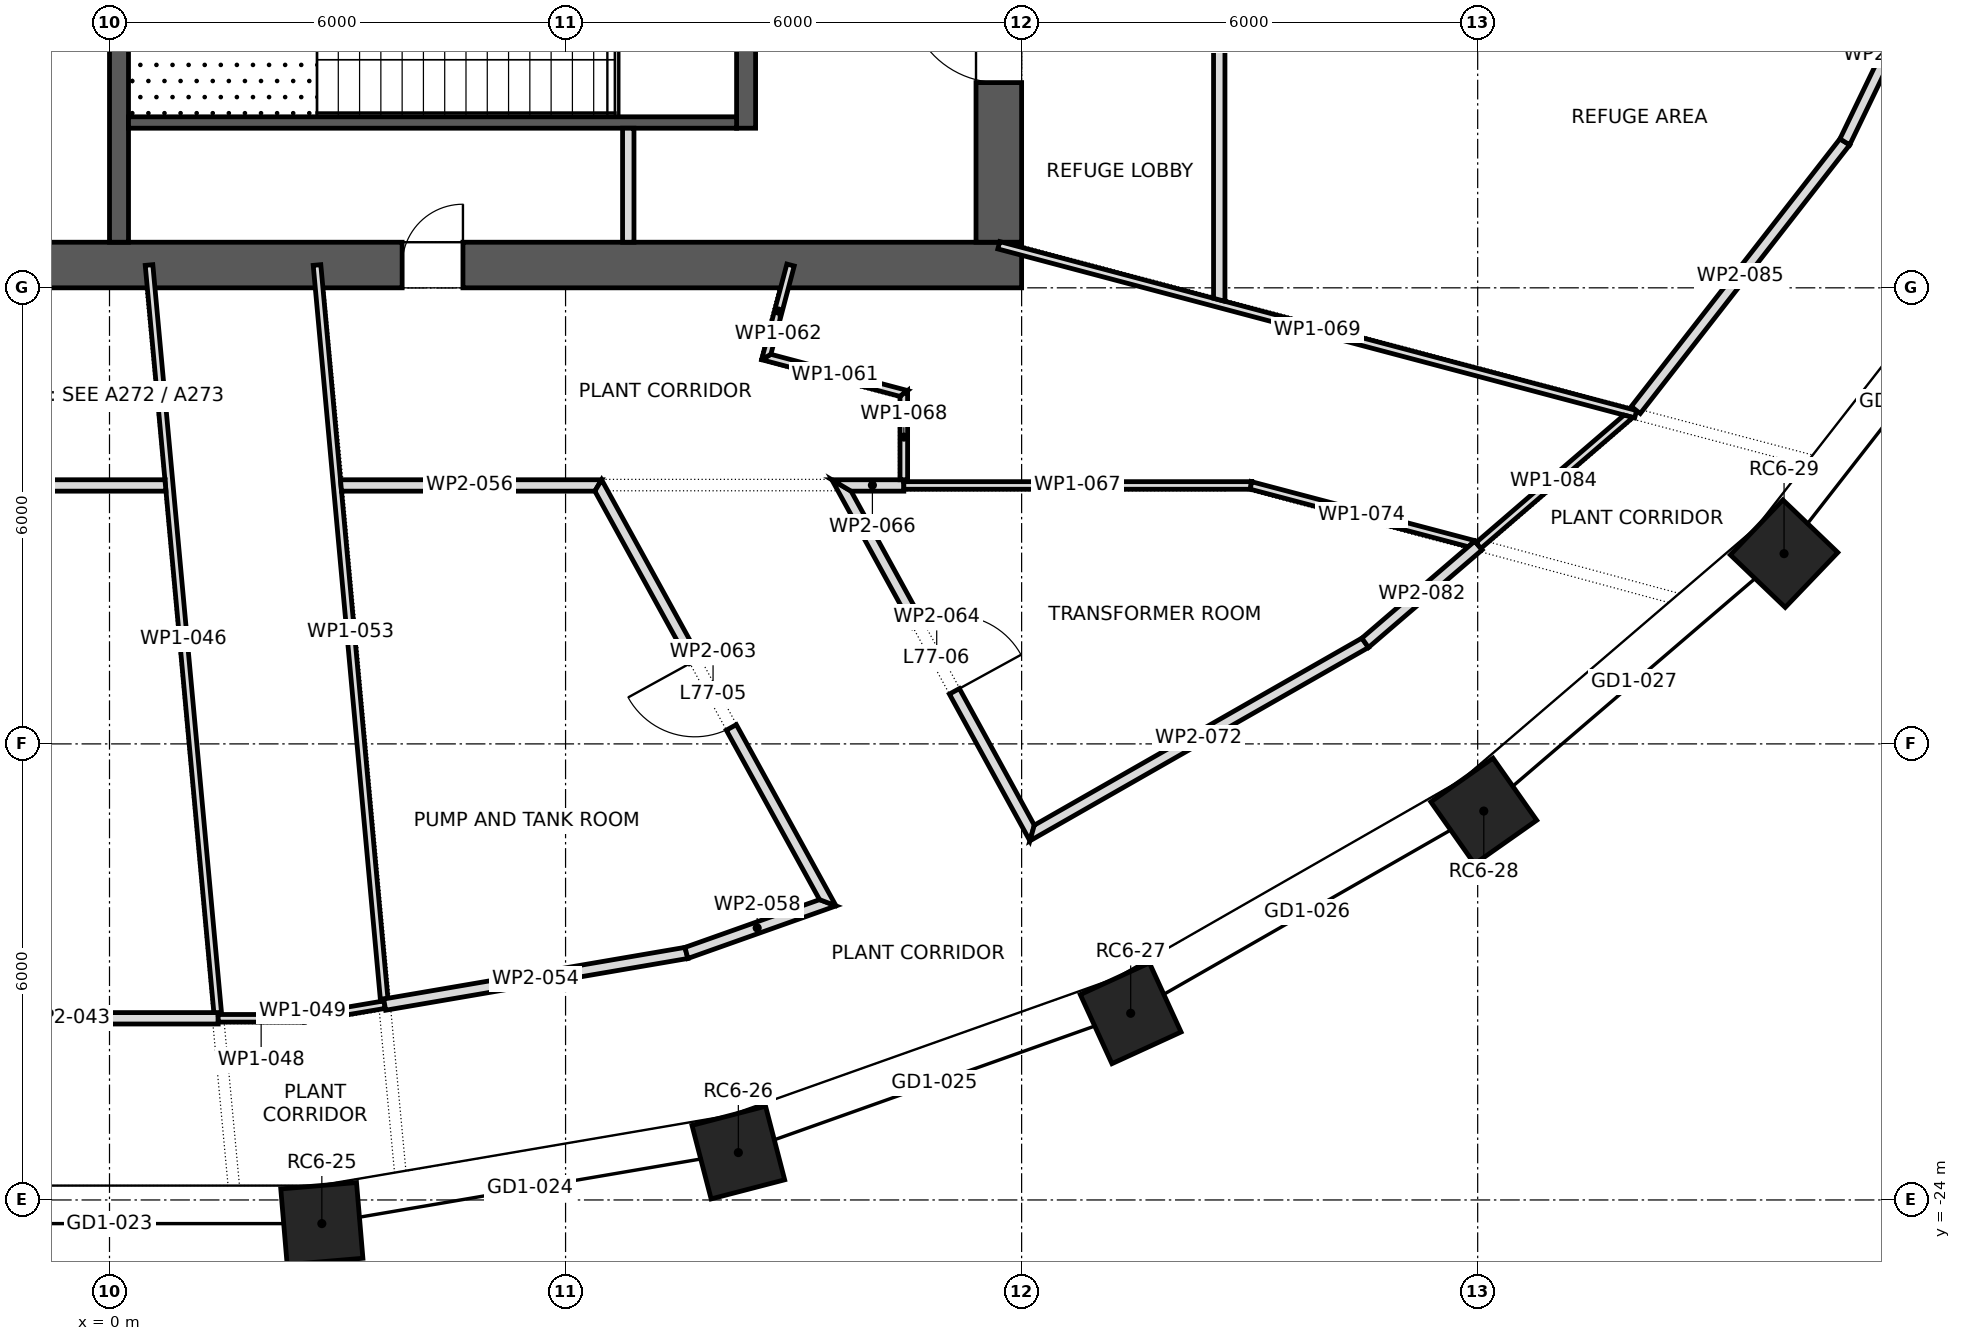
"""IFC4 building model, lengths in metres.
Left out: names, types, materials, properties, quantities, classifications, styles, units other than length and angle.
Written with IfcOpenShell. Run it as: python <this file> out.ifc"""

import sys

from ifc_helpers import new_model, si_unit, direction, frame, frame_2d, origin, origin_2d, place, context, subcontext, project, spatial, polyline, rectangle, outline, extrude, element, fill, save


model = new_model("IFC4")
c1 = context("Model", 3, precision=1e-05, world=origin(), true_north=direction((0.0, 1.0)))
c2 = subcontext(c1, "Body", "Model", "MODEL_VIEW")
j1 = project(units=[si_unit("LENGTHUNIT", "METRE"), si_unit("PLANEANGLEUNIT", "RADIAN")], contexts=[c1])
p1 = place(None, origin())
s1 = spatial("IfcSite", under=j1, at=p1, CompositionType="ELEMENT")
p2 = place(p1, origin())
s2 = spatial("IfcBuilding", under=s1, at=p2, CompositionType="ELEMENT")
p3 = place(p2, frame((0.0, 0.0, 328.3)))
s3 = spatial("IfcBuildingStorey", under=s2, at=p3, CompositionType="ELEMENT", Elevation=328.3)
for number, where, z_axis, x_axis in (
    (1, (2.793, -24.311, 0.0), (0.0, 0.0, 1.0), (0.996, 0.084, 0.0)),
    (2, (8.273, -23.377, 0.0), (0.0, 0.0, 1.0), (0.968, 0.252, 0.0)),
    (3, (13.435, -21.544, 0.0), (0.0, 0.0, 1.0), (0.909, 0.417, 0.0)),
    (4, (18.08, -18.884, 0.0), (0.0, 0.0, 1.0), (0.818, 0.575, 0.0)),
    (5, (22.031, -15.497, 0.0), (0.0, 0.0, 1.0), (0.692, 0.722, 0.0)),
):
    element("IfcColumn", number, at=place(p3, frame(where, z_axis=z_axis, x_axis=x_axis)), inside=s3, PredefinedType="COLUMN", context=c2, shape_type="SweptSolid", body=[
        extrude(rectangle(XDim=1.0, YDim=1.0, at=origin_2d()), origin(), (0.0, 0.0, 1.0), 5.0),
    ])
p4 = place(p3, frame((-12.0, -11.7, 0.0), z_axis=(0.0, 0.0, 1.0), x_axis=(1.0, 0.0, 0.0)))
e6 = element("IfcWall", 6, at=p4, inside=s3, PredefinedType="SHEAR", context=c2, shape_type="SweptSolid", body=[
    extrude(rectangle(XDim=24.0, YDim=0.6, at=frame_2d((12.0, 0.0))), origin(), (0.0, 0.0, 1.0), 5.0),
])
p5 = place(p4, frame((10.025, 0.0, 0.0)))
e7 = element("IfcOpeningElement", 7, at=p5, cuts=e6, PredefinedType="OPENING", context=c2, shape_type="SweptSolid", body=[
    extrude(rectangle(XDim=0.8, YDim=2.1, at=frame_2d((0.4, 1.05))), frame((0.0, 0.312, 0.0), z_axis=(0.0, -1.0, 0.0), x_axis=(1.0, 0.0, 0.0)), (0.0, 0.0, 1.0), 0.624),
])
p6 = place(p4, frame((4.2, 0.0, 0.0)))
e8 = element("IfcOpeningElement", 8, at=p6, cuts=e6, PredefinedType="OPENING", context=c2, shape_type="SweptSolid", body=[
    extrude(rectangle(XDim=0.8, YDim=2.1, at=frame_2d((0.4, 1.05))), frame((0.0, 0.312, 0.0), z_axis=(0.0, -1.0, 0.0), x_axis=(1.0, 0.0, 0.0)), (0.0, 0.0, 1.0), 0.624),
])
p7 = place(p4, frame((15.85, 0.0, 0.0)))
e9 = element("IfcOpeningElement", 9, at=p7, cuts=e6, PredefinedType="OPENING", context=c2, shape_type="SweptSolid", body=[
    extrude(rectangle(XDim=0.8, YDim=2.1, at=frame_2d((0.4, 1.05))), frame((0.0, 0.312, 0.0), z_axis=(0.0, -1.0, 0.0), x_axis=(1.0, 0.0, 0.0)), (0.0, 0.0, 1.0), 0.624),
])
p8 = place(p3, frame((11.7, -11.4, 0.0), z_axis=(0.0, 0.0, 1.0), x_axis=(0.0, 1.0, 0.0)))
e10 = element("IfcWall", 10, at=p8, inside=s3, PredefinedType="SHEAR", context=c2, shape_type="SweptSolid", body=[
    extrude(rectangle(XDim=22.8, YDim=0.6, at=frame_2d((11.4, 0.0))), origin(), (0.0, 0.0, 1.0), 5.0),
])
p9 = place(p8, frame((10.2, 0.0, 0.0)))
e11 = element("IfcOpeningElement", 11, at=p9, cuts=e10, PredefinedType="OPENING", context=c2, shape_type="SweptSolid", body=[
    extrude(rectangle(XDim=2.4, YDim=2.1, at=frame_2d((1.2, 1.05))), frame((0.0, 0.312, 0.0), z_axis=(0.0, -1.0, 0.0), x_axis=(1.0, 0.0, 0.0)), (0.0, 0.0, 1.0), 0.624),
])
p10 = place(p8, frame((19.5, 0.0, 0.0)))
e12 = element("IfcOpeningElement", 12, at=p10, cuts=e10, PredefinedType="OPENING", context=c2, shape_type="SweptSolid", body=[
    extrude(rectangle(XDim=1.2, YDim=2.1, at=frame_2d((0.6, 1.05))), frame((0.0, 0.312, 0.0), z_axis=(0.0, -1.0, 0.0), x_axis=(1.0, 0.0, 0.0)), (0.0, 0.0, 1.0), 0.624),
])
p11 = place(p8, frame((2.1, 0.0, 0.0)))
e13 = element("IfcOpeningElement", 13, at=p11, cuts=e10, PredefinedType="OPENING", context=c2, shape_type="SweptSolid", body=[
    extrude(rectangle(XDim=1.2, YDim=2.1, at=frame_2d((0.6, 1.05))), frame((0.0, 0.312, 0.0), z_axis=(0.0, -1.0, 0.0), x_axis=(1.0, 0.0, 0.0)), (0.0, 0.0, 1.0), 0.624),
])
p12 = place(p3, frame((0.125, -11.4, 0.0), z_axis=(0.0, 0.0, 1.0), x_axis=(0.0, 1.0, 0.0)))
e14 = element("IfcWall", 14, at=p12, inside=s3, PredefinedType="SHEAR", context=c2, shape_type="SweptSolid", body=[
    extrude(rectangle(XDim=4.9, YDim=0.25, at=frame_2d((2.45, 0.0))), origin(), (0.0, 0.0, 1.0), 4.65),
])
p13 = place(p3, frame((8.375, -9.9, 0.0), z_axis=(0.0, 0.0, 1.0), x_axis=(0.0, 1.0, 0.0)))
e15 = element("IfcWall", 15, at=p13, inside=s3, PredefinedType="SHEAR", context=c2, shape_type="SweptSolid", body=[
    extrude(rectangle(XDim=3.4, YDim=0.25, at=frame_2d((1.7, 0.0))), origin(), (0.0, 0.0, 1.0), 4.65),
])
p14 = place(p13, frame((1.175, 0.0, 0.0)))
e16 = element("IfcOpeningElement", 16, at=p14, cuts=e15, PredefinedType="OPENING", context=c2, shape_type="SweptSolid", body=[
    extrude(rectangle(XDim=1.2, YDim=2.1, at=frame_2d((0.6, 1.05))), frame((0.0, 0.137, 0.0), z_axis=(0.0, -1.0, 0.0), x_axis=(1.0, 0.0, 0.0)), (0.0, 0.0, 1.0), 0.274),
])
p15 = place(p3, frame((0.25, -9.825, 0.0), z_axis=(0.0, 0.0, 1.0), x_axis=(1.0, 0.0, 0.0)))
e17 = element("IfcWall", 17, at=p15, inside=s3, PredefinedType="SHEAR", context=c2, shape_type="SweptSolid", body=[
    extrude(rectangle(XDim=8.0, YDim=0.15, at=frame_2d((4.0, 0.0))), origin(), (0.0, 0.0, 1.0), 4.65),
])
p16 = place(p3, frame((6.825, -11.4, 0.0), z_axis=(0.0, 0.0, 1.0), x_axis=(0.0, 1.0, 0.0)))
e18 = element("IfcWall", 18, at=p16, inside=s3, PredefinedType="PARTITIONING", context=c2, shape_type="SweptSolid", body=[
    extrude(rectangle(XDim=1.5, YDim=0.15, at=frame_2d((0.75, 0.0))), origin(), (0.0, 0.0, 1.0), 4.65),
])
p17 = place(p3, frame((-2.566, -21.61, 0.0), z_axis=(0.0, 0.0, 1.0), x_axis=(1.0, 0.0, 0.0)))
e19 = element("IfcWall", 19, at=p17, inside=s3, PredefinedType="PARTITIONING", context=c2, shape_type="SweptSolid", body=[
    extrude(outline(polyline([(3.996, 0.075), (2.005, 0.075), (0.013, 0.075), (0.0, -0.075), (1.998, -0.075), (3.996, -0.075), (3.996, 0.075)])), origin(), (0.0, 0.0, 1.0), 4.65),
])
p18 = place(p3, frame((0.52, -11.7, 0.0), z_axis=(0.0, 0.0, 1.0), x_axis=(0.091437926601, -0.995810777999, 0.0)))
e20 = element("IfcWall", 20, at=p18, inside=s3, PredefinedType="PARTITIONING", context=c2, shape_type="SweptSolid", body=[
    extrude(outline(polyline([(0.0, -0.05), (1.416, -0.05), (2.832, -0.05), (2.833, -0.049), (2.842, -0.05), (4.599, -0.05), (6.357, -0.05), (8.114, -0.05), (9.872, -0.05), (9.877, 0.007), (9.902, 0.005), (9.906, 0.046), (9.906, 0.05), (7.925, 0.05), (5.943, 0.05), (3.962, 0.05), (1.981, 0.05), (0.0, 0.05), (0.0, -0.05)])), origin(), (0.0, 0.0, 1.0), 4.65),
])
p19 = place(p3, frame((0.742, -14.6, 0.0), z_axis=(0.0, 0.0, 1.0), x_axis=(-1.0, 0.0, 0.0)))
e21 = element("IfcWall", 21, at=p19, inside=s3, PredefinedType="PARTITIONING", context=c2, shape_type="SweptSolid", body=[
    extrude(outline(polyline([(0.013, -0.075), (1.408, -0.075), (2.802, -0.075), (4.196, -0.075), (4.142, 0.0), (4.088, 0.075), (2.726, 0.075), (1.363, 0.075), (0.0, 0.075), (0.0, 0.069), (0.013, -0.075)])), origin(), (0.0, 0.0, 1.0), 4.65),
])
p20 = place(p3, frame((1.43, -21.61, 0.0), z_axis=(0.0, 0.0, 1.0), x_axis=(1.0, 0.0, 0.0)))
e22 = element("IfcWall", 22, at=p20, inside=s3, PredefinedType="PARTITIONING", context=c2, shape_type="SweptSolid", body=[
    extrude(outline(polyline([(1.134, -0.05), (1.134, -0.05), (1.126, 0.05), (0.0, 0.05), (0.0, -0.05), (1.134, -0.05)])), origin(), (0.0, 0.0, 1.0), 4.65),
])
p21 = place(p3, frame((2.556, -21.611, 0.0), z_axis=(0.0, 0.0, 1.0), x_axis=(0.985894311429, 0.167369073287, 0.0)))
e23 = element("IfcWall", 23, at=p21, inside=s3, PredefinedType="PARTITIONING", context=c2, shape_type="SweptSolid", body=[
    extrude(outline(polyline([(1.079, 0.05), (0.008, 0.05), (0.0, -0.049), (0.0, -0.05), (1.079, -0.05), (1.079, 0.05)])), origin(), (0.0, 0.0, 1.0), 4.65),
])
p22 = place(p3, frame((2.73, -11.7, 0.0), z_axis=(0.0, 0.0, 1.0), x_axis=(0.091085808065, -0.995843047658, 0.0)))
e24 = element("IfcWall", 24, at=p22, inside=s3, PredefinedType="PARTITIONING", context=c2, shape_type="SweptSolid", body=[
    extrude(outline(polyline([(9.724, -0.05), (9.724, -0.05), (9.721, -0.004), (9.696, -0.006), (9.691, 0.05), (7.753, 0.05), (5.815, 0.05), (3.877, 0.05), (1.938, 0.05), (0.0, 0.05), (0.0, -0.05), (1.945, -0.05), (3.89, -0.05), (5.835, -0.05), (7.78, -0.05), (9.724, -0.05)])), origin(), (0.0, 0.0, 1.0), 4.65),
])
p23 = place(p3, frame((3.62, -21.43, 0.0), z_axis=(0.0, 0.0, 1.0), x_axis=(0.985641254307, 0.168852947287, 0.0)))
e25 = element("IfcWall", 25, at=p23, inside=s3, PredefinedType="PARTITIONING", context=c2, shape_type="SweptSolid", body=[
    extrude(outline(polyline([(4.034, -0.075), (4.034, -0.073), (4.021, 0.075), (2.681, 0.075), (1.34, 0.075), (0.0, 0.075), (0.0, -0.075), (1.345, -0.075), (2.689, -0.075), (4.034, -0.075)])), origin(), (0.0, 0.0, 1.0), 4.65),
])
p24 = place(p3, frame((6.474, -14.6, 0.0), z_axis=(0.0, 0.0, 1.0), x_axis=(-1.0, 0.0, 0.0)))
e26 = element("IfcWall", 26, at=p24, inside=s3, PredefinedType="PARTITIONING", context=c2, shape_type="SweptSolid", body=[
    extrude(outline(polyline([(3.435, -0.075), (3.435, -0.071), (3.422, 0.075), (1.755, 0.075), (0.089, 0.075), (0.044, 0.0), (0.0, -0.075), (1.718, -0.075), (3.435, -0.075)])), origin(), (0.0, 0.0, 1.0), 4.65),
])
p25 = place(p3, frame((7.584, -20.752, 0.0), z_axis=(0.0, 0.0, 1.0), x_axis=(0.942428945509, 0.334406463255, 0.0)))
e27 = element("IfcWall", 27, at=p25, inside=s3, PredefinedType="PARTITIONING", context=c2, shape_type="SweptSolid", body=[
    extrude(outline(polyline([(0.0, -0.075), (2.068, -0.075), (1.892, 0.075), (0.013, 0.075), (0.0, -0.074), (0.0, -0.075)])), origin(), (0.0, 0.0, 1.0), 4.65),
])
p26 = place(p3, frame((8.592, -12.897, 0.0), z_axis=(0.0, 0.0, 1.0), x_axis=(0.966587372572, -0.256337377657, 0.0)))
e28 = element("IfcWall", 28, at=p26, inside=s3, PredefinedType="PARTITIONING", context=c2, shape_type="SweptSolid", body=[
    extrude(outline(polyline([(0.0, -0.05), (1.884, -0.05), (1.961, 0.05), (0.1, 0.05), (0.0, -0.05), (0.0, -0.05)])), origin(), (0.0, 0.0, 1.0), 4.65),
])
p27 = place(p3, frame((8.96, -11.7, 0.0), z_axis=(0.0, 0.0, 1.0), x_axis=(-0.255665703413, -0.966765249737, 0.0)))
e29 = element("IfcWall", 29, at=p27, inside=s3, PredefinedType="PARTITIONING", context=c2, shape_type="SweptSolid", body=[
    extrude(outline(polyline([(1.302, -0.05), (1.302, -0.05), (1.202, 0.05), (0.0, 0.05), (0.0, -0.05), (1.302, -0.05)])), origin(), (0.0, 0.0, 1.0), 4.65),
])
p28 = place(p3, frame((9.492, -20.167, 0.0), z_axis=(0.0, 0.0, 1.0), x_axis=(-0.481958297576, 0.876194156222, 0.0)))
e30 = element("IfcWall", 30, at=p28, inside=s3, PredefinedType="PARTITIONING", context=c2, shape_type="SweptSolid", body=[
    extrude(outline(polyline([(0.0, -0.075), (1.6, -0.075), (3.199, -0.075), (4.799, -0.075), (6.398, -0.075), (6.31, 0.075), (4.776, 0.075), (3.243, 0.075), (1.71, 0.075), (0.176, 0.075), (0.0, -0.075), (0.0, -0.075)])), origin(), (0.0, 0.0, 1.0), 4.65),
])
p29 = place(p28, frame((2.721, 0.0, 0.0)))
e31 = element("IfcOpeningElement", 31, at=p29, cuts=e30, PredefinedType="OPENING", context=c2, shape_type="SweptSolid", body=[
    extrude(rectangle(XDim=1.0, YDim=2.1, at=frame_2d((0.5, 1.05))), frame((0.0, 0.087, 0.0), z_axis=(0.0, -1.0, 0.0), x_axis=(1.0, 0.0, 0.0)), (0.0, 0.0, 1.0), 0.174),
])
p30 = place(p3, frame((9.569, -14.489, 0.0), z_axis=(0.0, 0.0, 1.0), x_axis=(0.480884015224, -0.876784217412, 0.0)))
e32 = element("IfcWall", 32, at=p30, inside=s3, PredefinedType="PARTITIONING", context=c2, shape_type="SweptSolid", body=[
    extrude(outline(polyline([(5.418, -0.075), (5.418, -0.075), (5.266, 0.075), (3.595, 0.075), (1.924, 0.075), (0.253, 0.075), (0.0, -0.075), (0.0, -0.075), (1.806, -0.075), (3.612, -0.075), (5.418, -0.075)])), origin(), (0.0, 0.0, 1.0), 4.65),
])
p31 = place(p30, frame((2.216, 0.0, 0.0)))
e33 = element("IfcOpeningElement", 33, at=p31, cuts=e32, PredefinedType="OPENING", context=c2, shape_type="SweptSolid", body=[
    extrude(rectangle(XDim=1.0, YDim=2.1, at=frame_2d((0.5, 1.05))), frame((0.0, 0.087, 0.0), z_axis=(0.0, -1.0, 0.0), x_axis=(1.0, 0.0, 0.0)), (0.0, 0.0, 1.0), 0.174),
])
p32 = place(p3, frame((10.45, -14.6, 0.0), z_axis=(0.0, 0.0, 1.0), x_axis=(-1.0, 0.0, 0.0)))
e34 = element("IfcWall", 34, at=p32, inside=s3, PredefinedType="PARTITIONING", context=c2, shape_type="SweptSolid", body=[
    extrude(outline(polyline([(0.0, -0.075), (0.946, -0.075), (0.693, 0.075), (0.0, 0.075), (0.0, -0.075)])), origin(), (0.0, 0.0, 1.0), 4.65),
])
p33 = place(p3, frame((10.45, -14.6, 0.0), z_axis=(0.0, 0.0, 1.0), x_axis=(1.0, 0.0, 0.0)))
e35 = element("IfcWall", 35, at=p33, inside=s3, PredefinedType="PARTITIONING", context=c2, shape_type="SweptSolid", body=[
    extrude(outline(polyline([(0.0, -0.05), (1.52, -0.05), (3.04, -0.05), (4.56, -0.05), (4.573, 0.05), (4.573, 0.05), (3.049, 0.05), (1.524, 0.05), (0.0, 0.05), (0.0, -0.05)])), origin(), (0.0, 0.0, 1.0), 4.65),
])
p34 = place(p3, frame((10.45, -13.352, 0.0), z_axis=(0.0, 0.0, 1.0), x_axis=(0.0, -1.0, 0.0)))
e36 = element("IfcWall", 36, at=p34, inside=s3, PredefinedType="PARTITIONING", context=c2, shape_type="SweptSolid", body=[
    extrude(outline(polyline([(0.077, -0.05), (1.173, -0.05), (1.173, 0.0), (1.198, 0.0), (1.198, 0.05), (0.0, 0.05), (0.0, 0.05), (0.038, 0.0), (0.077, -0.05), (0.077, -0.05), (0.077, -0.05)])), origin(), (0.0, 0.0, 1.0), 4.65),
])
p35 = place(p3, frame((11.7, -11.44, 0.0), z_axis=(0.0, 0.0, 1.0), x_axis=(0.966559990697, -0.256440605959, 0.0)))
e37 = element("IfcWall", 37, at=p35, inside=s3, PredefinedType="PARTITIONING", context=c2, shape_type="SweptSolid", body=[
    extrude(rectangle(XDim=8.668, YDim=0.1, at=frame_2d((4.334, 0.0))), origin(), (0.0, 0.0, 1.0), 4.65),
])
p36 = place(p3, frame((12.072, -19.21, 0.0), z_axis=(0.0, 0.0, 1.0), x_axis=(0.868371978568, 0.495913406592, 0.0)))
e38 = element("IfcWall", 38, at=p36, inside=s3, PredefinedType="PARTITIONING", context=c2, shape_type="SweptSolid", body=[
    extrude(outline(polyline([(5.13, -0.075), (5.13, -0.074), (5.115, 0.075), (3.461, 0.075), (1.807, 0.075), (0.153, 0.075), (0.0, -0.075), (1.71, -0.075), (3.42, -0.075), (5.13, -0.075)])), origin(), (0.0, 0.0, 1.0), 4.65),
])
p37 = place(p3, frame((15.01, -14.598, 0.0), z_axis=(0.0, 0.0, 1.0), x_axis=(0.966889206018, -0.255196518952, 0.0)))
e39 = element("IfcWall", 39, at=p37, inside=s3, PredefinedType="PARTITIONING", context=c2, shape_type="SweptSolid", body=[
    extrude(outline(polyline([(0.013, -0.05), (1.495, -0.05), (2.977, -0.05), (3.04, 0.042), (3.061, 0.028), (3.076, 0.05), (3.076, 0.05), (1.538, 0.05), (0.0, 0.05), (0.013, -0.05), (0.013, -0.05), (0.013, -0.05)])), origin(), (0.0, 0.0, 1.0), 4.65),
])
p38 = place(p3, frame((14.6, -5.222, 0.0), z_axis=(0.0, 0.0, 1.0), x_axis=(0.0, -1.0, 0.0)))
e40 = element("IfcWall", 40, at=p38, inside=s3, PredefinedType="PARTITIONING", context=c2, shape_type="SweptSolid", body=[
    extrude(outline(polyline([(0.0, -0.075), (1.729, -0.075), (3.458, -0.075), (5.187, -0.075), (6.915, -0.075), (6.955, 0.074), (6.955, 0.075), (5.265, 0.075), (3.575, 0.075), (1.885, 0.075), (0.195, 0.075), (0.098, 0.0), (0.0, -0.075)])), origin(), (0.0, 0.0, 1.0), 4.65),
])
p39 = place(p3, frame((16.515, -16.675, 0.0), z_axis=(0.0, 0.0, 1.0), x_axis=(0.758460607648, 0.651718886213, 0.0)))
e41 = element("IfcWall", 41, at=p39, inside=s3, PredefinedType="PARTITIONING", context=c2, shape_type="SweptSolid", body=[
    extrude(outline(polyline([(1.972, 0.075), (0.014, 0.075), (0.0, -0.075), (0.0, -0.075), (1.972, -0.075), (1.972, 0.075)])), origin(), (0.0, 0.0, 1.0), 4.65),
])
p40 = place(p3, frame((18.01, -15.39, 0.0), z_axis=(0.0, 0.0, 1.0), x_axis=(0.757687492776, 0.652617547489, 0.0)))
e42 = element("IfcWall", 42, at=p40, inside=s3, PredefinedType="PARTITIONING", context=c2, shape_type="SweptSolid", body=[
    extrude(outline(polyline([(2.64, -0.05), (2.64, -0.05), (2.571, 0.05), (1.299, 0.05), (0.026, 0.05), (0.0, 0.032), (0.0, -0.05), (1.32, -0.05), (2.64, -0.05)])), origin(), (0.0, 0.0, 1.0), 4.65),
])
p41 = place(p3, frame((20.08, -13.607, 0.0), z_axis=(0.0, 0.0, 1.0), x_axis=(0.614871892474, 0.788627006794, 0.0)))
e43 = element("IfcWall", 43, at=p41, inside=s3, PredefinedType="PARTITIONING", context=c2, shape_type="SweptSolid", body=[
    extrude(outline(polyline([(4.481, -0.075), (4.481, -0.074), (4.465, 0.075), (2.977, 0.075), (1.488, 0.075), (0.0, 0.075), (0.0, -0.075), (1.494, -0.075), (2.987, -0.075), (4.481, -0.075)])), origin(), (0.0, 0.0, 1.0), 4.65),
])
p42 = place(p3, frame((22.826, -10.087, 0.0), z_axis=(0.0, 0.0, 1.0), x_axis=(0.434582931339, 0.900631820329, 0.0)))
e44 = element("IfcWall", 44, at=p42, inside=s3, PredefinedType="PARTITIONING", context=c2, shape_type="SweptSolid", body=[
    extrude(outline(polyline([(0.0, -0.075), (1.315, -0.075), (2.63, -0.075), (2.449, 0.075), (0.016, 0.075), (0.0, -0.075)])), origin(), (0.0, 0.0, 1.0), 4.65),
])
p43 = place(p11, origin())
e45 = element("IfcDoor", 45, at=p43, inside=s3, OperationType="SINGLE_SWING_LEFT", PredefinedType="DOOR", context=c2, shape_type="SweptSolid", body=[
    extrude(rectangle(XDim=1.2, YDim=2.1, at=frame_2d((0.6, 1.05))), frame((0.0, 0.025, 0.0), z_axis=(0.0, -1.0, 0.0), x_axis=(1.0, 0.0, 0.0)), (0.0, 0.0, 1.0), 0.05),
])
fill(e13, e45)
p44 = place(p7, origin())
e46 = element("IfcDoor", 46, at=p44, inside=s3, OperationType="SINGLE_SWING_LEFT", PredefinedType="DOOR", context=c2, shape_type="SweptSolid", body=[
    extrude(rectangle(XDim=0.8, YDim=2.1, at=frame_2d((0.4, 1.05))), frame((0.0, 0.025, 0.0), z_axis=(0.0, -1.0, 0.0), x_axis=(1.0, 0.0, 0.0)), (0.0, 0.0, 1.0), 0.05),
])
fill(e9, e46)
p45 = place(p29, origin())
e47 = element("IfcDoor", 47, at=p45, inside=s3, OperationType="SINGLE_SWING_LEFT", PredefinedType="DOOR", context=c2, shape_type="SweptSolid", body=[
    extrude(rectangle(XDim=1.0, YDim=2.1, at=frame_2d((0.5, 1.05))), frame((0.0, 0.025, 0.0), z_axis=(0.0, -1.0, 0.0), x_axis=(1.0, 0.0, 0.0)), (0.0, 0.0, 1.0), 0.05),
])
fill(e31, e47)
p46 = place(p31, origin())
e48 = element("IfcDoor", 48, at=p46, inside=s3, OperationType="SINGLE_SWING_LEFT", PredefinedType="DOOR", context=c2, shape_type="SweptSolid", body=[
    extrude(rectangle(XDim=1.0, YDim=2.1, at=frame_2d((0.5, 1.05))), frame((0.0, 0.025, 0.0), z_axis=(0.0, -1.0, 0.0), x_axis=(1.0, 0.0, 0.0)), (0.0, 0.0, 1.0), 0.05),
])
fill(e33, e48)
save(model, sys.argv[1])
